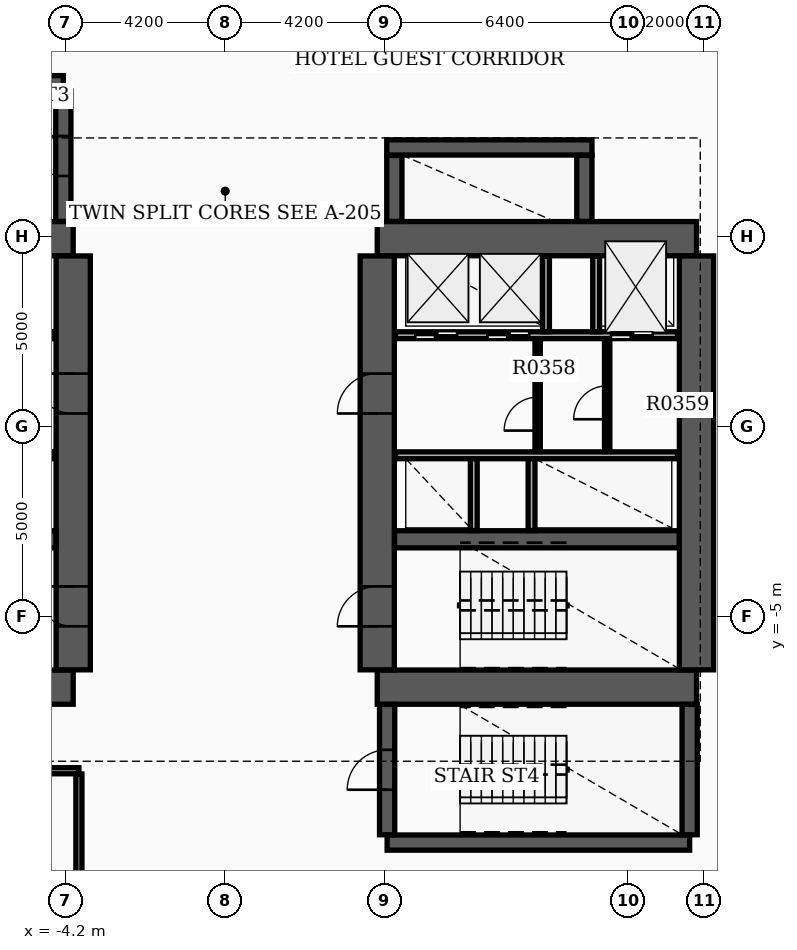
"""IFC4 building model, lengths in metres.
Left out: names, types, materials, properties, quantities, classifications, styles, units other than length and angle.
Written with IfcOpenShell. Run it as: python <this file> out.ifc"""

import sys

from ifc_helpers import new_model, si_unit, direction, frame, frame_2d, origin, place, context, subcontext, project, spatial, rectangle, extrude, element, fill, save


model = new_model("IFC4")
c1 = context("Model", 3, precision=1e-05, world=origin(), true_north=direction((0.0, 1.0)))
c2 = subcontext(c1, "Body", "Model", "MODEL_VIEW")
j1 = project(units=[si_unit("LENGTHUNIT", "METRE"), si_unit("PLANEANGLEUNIT", "RADIAN")], contexts=[c1])
p1 = place(None, origin())
s1 = spatial("IfcSite", under=j1, at=p1, CompositionType="ELEMENT")
p2 = place(p1, origin())
s2 = spatial("IfcBuilding", under=s1, at=p2, CompositionType="ELEMENT")
p3 = place(p2, frame((0.0, 0.0, 27.6)))
s3 = spatial("IfcBuildingStorey", under=s2, at=p3, CompositionType="ELEMENT", Elevation=27.6)
for number, where, z_axis, x_axis in (
    (1, (-12.4, -6.85, 0.0), (0.0, 0.0, 1.0), (1.0, 0.0, 0.0)),
    (2, (-12.4, 4.95, 0.0), (0.0, 0.0, 1.0), (1.0, 0.0, 0.0)),
):
    element("IfcWall", number, at=place(p3, frame(where, z_axis=z_axis, x_axis=x_axis)), inside=s3, PredefinedType="SHEAR", context=c2, shape_type="SweptSolid", body=[
        extrude(rectangle(XDim=8.4, YDim=0.9, at=frame_2d((4.2, 0.0))), origin(), (0.0, 0.0, 1.0), 3.7),
    ])
p4 = place(p3, frame((-4.0, -6.395, 0.0), z_axis=(0.0, 0.0, 1.0), x_axis=(0.0, 1.0, 0.0)))
e3 = element("IfcWall", 3, at=p4, inside=s3, PredefinedType="SHEAR", context=c2, shape_type="SweptSolid", body=[
    extrude(rectangle(XDim=10.89, YDim=0.9, at=frame_2d((5.445, 0.0))), origin(), (0.0, 0.0, 1.0), 3.7),
])
p5 = place(p4, frame((1.145, 0.0, 0.0)))
e4 = element("IfcOpeningElement", 4, at=p5, cuts=e3, PredefinedType="OPENING", context=c2, shape_type="SweptSolid", body=[
    extrude(rectangle(XDim=1.05, YDim=2.15, at=frame_2d((0.525, 1.075))), frame((0.0, 0.46, 0.0), z_axis=(0.0, -1.0, 0.0), x_axis=(1.0, 0.0, 0.0)), (0.0, 0.0, 1.0), 0.92),
])
p6 = place(p4, frame((6.745, 0.0, 0.0)))
e5 = element("IfcOpeningElement", 5, at=p6, cuts=e3, PredefinedType="OPENING", context=c2, shape_type="SweptSolid", body=[
    extrude(rectangle(XDim=1.05, YDim=2.15, at=frame_2d((0.525, 1.075))), frame((0.0, 0.46, 0.0), z_axis=(0.0, -1.0, 0.0), x_axis=(1.0, 0.0, 0.0)), (0.0, 0.0, 1.0), 0.92),
])
p7 = place(p3, frame((-11.945, -2.96, 0.0), z_axis=(0.0, 0.0, 1.0), x_axis=(1.0, 0.0, 0.0)))
e6 = element("IfcWall", 6, at=p7, inside=s3, PredefinedType="SHEAR", context=c2, shape_type="SweptSolid", body=[
    extrude(rectangle(XDim=7.49, YDim=0.45, at=frame_2d((3.745, 0.0))), origin(), (0.0, 0.0, 1.0), 3.7),
])
for number, where, z_axis, x_axis in (
    (7, (4.0, -6.85, 0.0), (0.0, 0.0, 1.0), (1.0, 0.0, 0.0)),
    (8, (4.0, 4.95, 0.0), (0.0, 0.0, 1.0), (1.0, 0.0, 0.0)),
):
    element("IfcWall", number, at=place(p3, frame(where, z_axis=z_axis, x_axis=x_axis)), inside=s3, PredefinedType="SHEAR", context=c2, shape_type="SweptSolid", body=[
        extrude(rectangle(XDim=8.4, YDim=0.9, at=frame_2d((4.2, 0.0))), origin(), (0.0, 0.0, 1.0), 3.7),
    ])
p8 = place(p3, frame((4.0, -6.395, 0.0), z_axis=(0.0, 0.0, 1.0), x_axis=(0.0, 1.0, 0.0)))
e9 = element("IfcWall", 9, at=p8, inside=s3, PredefinedType="SHEAR", context=c2, shape_type="SweptSolid", body=[
    extrude(rectangle(XDim=10.89, YDim=0.9, at=frame_2d((5.445, 0.0))), origin(), (0.0, 0.0, 1.0), 3.7),
])
p9 = place(p8, frame((1.145, 0.0, 0.0)))
e10 = element("IfcOpeningElement", 10, at=p9, cuts=e9, PredefinedType="OPENING", context=c2, shape_type="SweptSolid", body=[
    extrude(rectangle(XDim=1.05, YDim=2.15, at=frame_2d((0.525, 1.075))), frame((0.0, 0.46, 0.0), z_axis=(0.0, -1.0, 0.0), x_axis=(1.0, 0.0, 0.0)), (0.0, 0.0, 1.0), 0.92),
])
p10 = place(p8, frame((6.745, 0.0, 0.0)))
e11 = element("IfcOpeningElement", 11, at=p10, cuts=e9, PredefinedType="OPENING", context=c2, shape_type="SweptSolid", body=[
    extrude(rectangle(XDim=1.05, YDim=2.15, at=frame_2d((0.525, 1.075))), frame((0.0, 0.46, 0.0), z_axis=(0.0, -1.0, 0.0), x_axis=(1.0, 0.0, 0.0)), (0.0, 0.0, 1.0), 0.92),
])
p11 = place(p3, frame((12.4, -6.395, 0.0), z_axis=(0.0, 0.0, 1.0), x_axis=(0.0, 1.0, 0.0)))
e12 = element("IfcWall", 12, at=p11, inside=s3, PredefinedType="SHEAR", context=c2, shape_type="SweptSolid", body=[
    extrude(rectangle(XDim=10.89, YDim=0.9, at=frame_2d((5.445, 0.0))), origin(), (0.0, 0.0, 1.0), 3.7),
])
p12 = place(p3, frame((4.455, -2.96, 0.0), z_axis=(0.0, 0.0, 1.0), x_axis=(1.0, 0.0, 0.0)))
e13 = element("IfcWall", 13, at=p12, inside=s3, PredefinedType="SHEAR", context=c2, shape_type="SweptSolid", body=[
    extrude(rectangle(XDim=7.49, YDim=0.45, at=frame_2d((3.745, 0.0))), origin(), (0.0, 0.0, 1.0), 3.7),
])
p13 = place(p3, frame((-12.22, 9.04, 0.0), z_axis=(0.0, 0.0, 1.0), x_axis=(1.0, 0.0, 0.0)))
e14 = element("IfcWall", 14, at=p13, inside=s3, PredefinedType="SHEAR", context=c2, shape_type="SweptSolid", body=[
    extrude(rectangle(XDim=7.96, YDim=0.4, at=frame_2d((3.98, 0.0))), origin(), (0.0, 0.0, 1.0), 3.7),
])
p14 = place(p3, frame((-4.26, 5.405, 0.0), z_axis=(0.0, 0.0, 1.0), x_axis=(0.0, 1.0, 0.0)))
e15 = element("IfcWall", 15, at=p14, inside=s3, PredefinedType="SHEAR", context=c2, shape_type="SweptSolid", body=[
    extrude(rectangle(XDim=3.43, YDim=0.4, at=frame_2d((1.715, 0.0))), origin(), (0.0, 0.0, 1.0), 3.7),
])
p15 = place(p14, frame((1.195, 0.0, 0.0)))
e16 = element("IfcOpeningElement", 16, at=p15, cuts=e15, PredefinedType="OPENING", context=c2, shape_type="SweptSolid", body=[
    extrude(rectangle(XDim=1.05, YDim=2.15, at=frame_2d((0.525, 1.075))), frame((0.0, 0.21, 0.0), z_axis=(0.0, -1.0, 0.0), x_axis=(1.0, 0.0, 0.0)), (0.0, 0.0, 1.0), 0.42),
])
p16 = place(p3, frame((4.26, -10.94, 0.0), z_axis=(0.0, 0.0, 1.0), x_axis=(1.0, 0.0, 0.0)))
e17 = element("IfcWall", 17, at=p16, inside=s3, PredefinedType="SHEAR", context=c2, shape_type="SweptSolid", body=[
    extrude(rectangle(XDim=7.96, YDim=0.4, at=frame_2d((3.98, 0.0))), origin(), (0.0, 0.0, 1.0), 3.7),
])
p17 = place(p3, frame((4.26, -10.735, 0.0), z_axis=(0.0, 0.0, 1.0), x_axis=(0.0, 1.0, 0.0)))
e18 = element("IfcWall", 18, at=p17, inside=s3, PredefinedType="SHEAR", context=c2, shape_type="SweptSolid", body=[
    extrude(rectangle(XDim=3.43, YDim=0.4, at=frame_2d((1.715, 0.0))), origin(), (0.0, 0.0, 1.0), 3.7),
])
p18 = place(p17, frame((1.185, 0.0, 0.0)))
e19 = element("IfcOpeningElement", 19, at=p18, cuts=e18, PredefinedType="OPENING", context=c2, shape_type="SweptSolid", body=[
    extrude(rectangle(XDim=1.05, YDim=2.15, at=frame_2d((0.525, 1.075))), frame((0.0, 0.21, 0.0), z_axis=(0.0, -1.0, 0.0), x_axis=(1.0, 0.0, 0.0)), (0.0, 0.0, 1.0), 0.42),
])
p19 = place(p3, frame((12.22, -10.735, 0.0), z_axis=(0.0, 0.0, 1.0), x_axis=(0.0, 1.0, 0.0)))
e20 = element("IfcWall", 20, at=p19, inside=s3, PredefinedType="SHEAR", context=c2, shape_type="SweptSolid", body=[
    extrude(rectangle(XDim=3.43, YDim=0.4, at=frame_2d((1.715, 0.0))), origin(), (0.0, 0.0, 1.0), 3.7),
])
p20 = place(p3, frame((4.45, 5.405, 0.0), z_axis=(0.0, 0.0, 1.0), x_axis=(0.0, 1.0, 0.0)))
e21 = element("IfcWall", 21, at=p20, inside=s3, PredefinedType="SHEAR", context=c2, shape_type="SweptSolid", body=[
    extrude(rectangle(XDim=1.735, YDim=0.4, at=frame_2d((0.867, 0.0))), origin(), (0.0, 0.0, 1.0), 3.7),
])
p21 = place(p3, frame((4.25, 7.35, 0.0), z_axis=(0.0, 0.0, 1.0), x_axis=(1.0, 0.0, 0.0)))
e22 = element("IfcWall", 22, at=p21, inside=s3, PredefinedType="SHEAR", context=c2, shape_type="SweptSolid", body=[
    extrude(rectangle(XDim=5.4, YDim=0.4, at=frame_2d((2.7, 0.0))), origin(), (0.0, 0.0, 1.0), 3.7),
])
p22 = place(p3, frame((9.45, 5.405, 0.0), z_axis=(0.0, 0.0, 1.0), x_axis=(0.0, 1.0, 0.0)))
e23 = element("IfcWall", 23, at=p22, inside=s3, PredefinedType="SHEAR", context=c2, shape_type="SweptSolid", body=[
    extrude(rectangle(XDim=1.735, YDim=0.4, at=frame_2d((0.867, 0.0))), origin(), (0.0, 0.0, 1.0), 3.7),
])
p23 = place(p3, frame((-11.9, 2.41, 0.0), z_axis=(0.0, 0.0, 1.0), x_axis=(1.0, 0.0, 0.0)))
e24 = element("IfcWall", 24, at=p23, inside=s3, PredefinedType="SOLIDWALL", context=c2, shape_type="SweptSolid", body=[
    extrude(rectangle(XDim=7.42, YDim=0.18, at=frame_2d((3.71, 0.0))), origin(), (0.0, 0.0, 1.0), 2.9),
])
p24 = place(p23, frame((0.55, 0.0, 0.0)))
e25 = element("IfcOpeningElement", 25, at=p24, cuts=e24, PredefinedType="OPENING", context=c2, shape_type="SweptSolid", body=[
    extrude(rectangle(XDim=1.1, YDim=2.15, at=frame_2d((0.55, 1.075))), frame((0.0, 0.1, 0.0), z_axis=(0.0, -1.0, 0.0), x_axis=(1.0, 0.0, 0.0)), (0.0, 0.0, 1.0), 0.2),
])
p25 = place(p23, frame((3.85, 0.0, 0.0)))
e26 = element("IfcOpeningElement", 26, at=p25, cuts=e24, PredefinedType="OPENING", context=c2, shape_type="SweptSolid", body=[
    extrude(rectangle(XDim=1.1, YDim=2.15, at=frame_2d((0.55, 1.075))), frame((0.0, 0.1, 0.0), z_axis=(0.0, -1.0, 0.0), x_axis=(1.0, 0.0, 0.0)), (0.0, 0.0, 1.0), 0.2),
])
p26 = place(p23, frame((5.75, 0.0, 0.0)))
e27 = element("IfcOpeningElement", 27, at=p26, cuts=e24, PredefinedType="OPENING", context=c2, shape_type="SweptSolid", body=[
    extrude(rectangle(XDim=1.1, YDim=2.15, at=frame_2d((0.55, 1.075))), frame((0.0, 0.1, 0.0), z_axis=(0.0, -1.0, 0.0), x_axis=(1.0, 0.0, 0.0)), (0.0, 0.0, 1.0), 0.2),
])
p27 = place(p3, frame((4.48, 2.41, 0.0), z_axis=(0.0, 0.0, 1.0), x_axis=(1.0, 0.0, 0.0)))
e28 = element("IfcWall", 28, at=p27, inside=s3, PredefinedType="SOLIDWALL", context=c2, shape_type="SweptSolid", body=[
    extrude(rectangle(XDim=7.42, YDim=0.18, at=frame_2d((3.71, 0.0))), origin(), (0.0, 0.0, 1.0), 2.9),
])
p28 = place(p27, frame((5.67, 0.0, 0.0)))
e29 = element("IfcOpeningElement", 29, at=p28, cuts=e28, PredefinedType="OPENING", context=c2, shape_type="SweptSolid", body=[
    extrude(rectangle(XDim=1.1, YDim=2.15, at=frame_2d((0.55, 1.075))), frame((0.0, 0.1, 0.0), z_axis=(0.0, -1.0, 0.0), x_axis=(1.0, 0.0, 0.0)), (0.0, 0.0, 1.0), 0.2),
])
p29 = place(p27, frame((0.52, 0.0, 0.0)))
e30 = element("IfcOpeningElement", 30, at=p29, cuts=e28, PredefinedType="OPENING", context=c2, shape_type="SweptSolid", body=[
    extrude(rectangle(XDim=1.1, YDim=2.15, at=frame_2d((0.55, 1.075))), frame((0.0, 0.1, 0.0), z_axis=(0.0, -1.0, 0.0), x_axis=(1.0, 0.0, 0.0)), (0.0, 0.0, 1.0), 0.2),
])
p30 = place(p27, frame((2.42, 0.0, 0.0)))
e31 = element("IfcOpeningElement", 31, at=p30, cuts=e28, PredefinedType="OPENING", context=c2, shape_type="SweptSolid", body=[
    extrude(rectangle(XDim=1.1, YDim=2.15, at=frame_2d((0.55, 1.075))), frame((0.0, 0.1, 0.0), z_axis=(0.0, -1.0, 0.0), x_axis=(1.0, 0.0, 0.0)), (0.0, 0.0, 1.0), 0.2),
])
for number, where, z_axis, x_axis in (
    (32, (-11.9, -0.75, 0.0), (0.0, 0.0, 1.0), (1.0, 0.0, 0.0)),
    (33, (4.48, -0.75, 0.0), (0.0, 0.0, 1.0), (1.0, 0.0, 0.0)),
):
    element("IfcWall", number, at=place(p3, frame(where, z_axis=z_axis, x_axis=x_axis)), inside=s3, PredefinedType="SOLIDWALL", context=c2, shape_type="SweptSolid", body=[
        extrude(rectangle(XDim=7.42, YDim=0.18, at=frame_2d((3.71, 0.0))), origin(), (0.0, 0.0, 1.0), 2.9),
    ])
for number, where, z_axis, x_axis in (
    (34, (8.44, 2.5, 0.0), (0.0, 0.0, 1.0), (0.0, 1.0, 0.0)),
    (35, (9.76, 2.5, 0.0), (0.0, 0.0, 1.0), (0.0, 1.0, 0.0)),
):
    element("IfcWall", number, at=place(p3, frame(where, z_axis=z_axis, x_axis=x_axis)), inside=s3, PredefinedType="SOLIDWALL", context=c2, shape_type="SweptSolid", body=[
        extrude(rectangle(XDim=1.99, YDim=0.18, at=frame_2d((0.995, 0.0))), origin(), (0.0, 0.0, 1.0), 2.9),
    ])
for number, where, z_axis, x_axis in (
    (36, (6.54, -2.73, 0.0), (0.0, 0.0, 1.0), (0.0, 1.0, 0.0)),
    (37, (8.06, -2.73, 0.0), (0.0, 0.0, 1.0), (0.0, 1.0, 0.0)),
):
    element("IfcWall", number, at=place(p3, frame(where, z_axis=z_axis, x_axis=x_axis)), inside=s3, PredefinedType="SOLIDWALL", context=c2, shape_type="SweptSolid", body=[
        extrude(rectangle(XDim=1.89, YDim=0.18, at=frame_2d((0.945, 0.0))), origin(), (0.0, 0.0, 1.0), 2.9),
    ])
p31 = place(p3, frame((8.22, -0.65, 0.0), z_axis=(0.0, 0.0, 1.0), x_axis=(0.0, 1.0, 0.0)))
e38 = element("IfcWall", 38, at=p31, inside=s3, PredefinedType="SOLIDWALL", context=c2, shape_type="SweptSolid", body=[
    extrude(rectangle(XDim=2.96, YDim=0.14, at=frame_2d((1.48, 0.0))), origin(), (0.0, 0.0, 1.0), 2.9),
])
p32 = place(p31, frame((0.55, 0.0, 0.0)))
e39 = element("IfcOpeningElement", 39, at=p32, cuts=e38, PredefinedType="OPENING", context=c2, shape_type="SweptSolid", body=[
    extrude(rectangle(XDim=0.88, YDim=2.1, at=frame_2d((0.44, 1.05))), frame((0.0, 0.08, 0.0), z_axis=(0.0, -1.0, 0.0), x_axis=(1.0, 0.0, 0.0)), (0.0, 0.0, 1.0), 0.16),
])
p33 = place(p3, frame((10.05, -0.652, 0.0), z_axis=(0.0, 0.0, 1.0), x_axis=(0.0, 1.0, 0.0)))
e40 = element("IfcWall", 40, at=p33, inside=s3, PredefinedType="PARTITIONING", context=c2, shape_type="SweptSolid", body=[
    extrude(rectangle(XDim=2.962, YDim=0.14, at=frame_2d((1.481, 0.0))), origin(), (0.0, 0.0, 1.0), 2.9),
])
p34 = place(p33, frame((0.85, 0.0, 0.0)))
e41 = element("IfcOpeningElement", 41, at=p34, cuts=e40, PredefinedType="OPENING", context=c2, shape_type="SweptSolid", body=[
    extrude(rectangle(XDim=0.88, YDim=2.1, at=frame_2d((0.44, 1.05))), frame((0.0, 0.08, 0.0), z_axis=(0.0, -1.0, 0.0), x_axis=(1.0, 0.0, 0.0)), (0.0, 0.0, 1.0), 0.16),
])
p35 = place(p3, frame((-12.4, -9.05, 0.0), z_axis=(0.0, 0.0, 1.0), x_axis=(1.0, 0.0, 0.0)))
e42 = element("IfcWall", 42, at=p35, inside=s3, PredefinedType="PARTITIONING", context=c2, shape_type="SweptSolid", body=[
    extrude(rectangle(XDim=8.55, YDim=0.16, at=frame_2d((4.275, 0.0))), origin(), (0.0, 0.0, 1.0), 2.9),
])
p36 = place(p35, frame((3.795, 0.0, 0.0)))
e43 = element("IfcOpeningElement", 43, at=p36, cuts=e42, PredefinedType="OPENING", context=c2, shape_type="SweptSolid", body=[
    extrude(rectangle(XDim=0.96, YDim=2.15, at=frame_2d((0.48, 1.075))), frame((0.0, 0.09, 0.0), z_axis=(0.0, -1.0, 0.0), x_axis=(1.0, 0.0, 0.0)), (0.0, 0.0, 1.0), 0.18),
])
p37 = place(p3, frame((-3.85, -13.065, 0.0), z_axis=(0.0, 0.0, 1.0), x_axis=(0.0, 1.0, 0.0)))
e44 = element("IfcWall", 44, at=p37, inside=s3, PredefinedType="PARTITIONING", context=c2, shape_type="SweptSolid", body=[
    extrude(rectangle(XDim=3.93, YDim=0.16, at=frame_2d((1.965, 0.0))), origin(), (0.0, 0.0, 1.0), 2.9),
])
p38 = place(p5, origin())
e45 = element("IfcDoor", 45, at=p38, inside=s3, OperationType="SINGLE_SWING_RIGHT", PredefinedType="DOOR", context=c2, shape_type="SweptSolid", body=[
    extrude(rectangle(XDim=1.05, YDim=2.15, at=frame_2d((0.525, 1.075))), frame((0.0, 0.025, 0.0), z_axis=(0.0, -1.0, 0.0), x_axis=(1.0, 0.0, 0.0)), (0.0, 0.0, 1.0), 0.05),
])
fill(e4, e45)
p39 = place(p9, origin())
e46 = element("IfcDoor", 46, at=p39, inside=s3, OperationType="SINGLE_SWING_LEFT", PredefinedType="DOOR", context=c2, shape_type="SweptSolid", body=[
    extrude(rectangle(XDim=1.05, YDim=2.15, at=frame_2d((0.525, 1.075))), frame((0.0, 0.025, 0.0), z_axis=(0.0, -1.0, 0.0), x_axis=(1.0, 0.0, 0.0)), (0.0, 0.0, 1.0), 0.05),
])
fill(e10, e46)
p40 = place(p6, origin())
e47 = element("IfcDoor", 47, at=p40, inside=s3, OperationType="SINGLE_SWING_RIGHT", PredefinedType="DOOR", context=c2, shape_type="SweptSolid", body=[
    extrude(rectangle(XDim=1.05, YDim=2.15, at=frame_2d((0.525, 1.075))), frame((0.0, 0.025, 0.0), z_axis=(0.0, -1.0, 0.0), x_axis=(1.0, 0.0, 0.0)), (0.0, 0.0, 1.0), 0.05),
])
fill(e5, e47)
p41 = place(p10, origin())
e48 = element("IfcDoor", 48, at=p41, inside=s3, OperationType="SINGLE_SWING_LEFT", PredefinedType="DOOR", context=c2, shape_type="SweptSolid", body=[
    extrude(rectangle(XDim=1.05, YDim=2.15, at=frame_2d((0.525, 1.075))), frame((0.0, 0.025, 0.0), z_axis=(0.0, -1.0, 0.0), x_axis=(1.0, 0.0, 0.0)), (0.0, 0.0, 1.0), 0.05),
])
fill(e11, e48)
p42 = place(p15, origin())
e49 = element("IfcDoor", 49, at=p42, inside=s3, OperationType="SINGLE_SWING_RIGHT", PredefinedType="DOOR", context=c2, shape_type="SweptSolid", body=[
    extrude(rectangle(XDim=1.05, YDim=2.15, at=frame_2d((0.525, 1.075))), frame((0.0, 0.025, 0.0), z_axis=(0.0, -1.0, 0.0), x_axis=(1.0, 0.0, 0.0)), (0.0, 0.0, 1.0), 0.05),
])
fill(e16, e49)
p43 = place(p18, origin())
e50 = element("IfcDoor", 50, at=p43, inside=s3, OperationType="SINGLE_SWING_LEFT", PredefinedType="DOOR", context=c2, shape_type="SweptSolid", body=[
    extrude(rectangle(XDim=1.05, YDim=2.15, at=frame_2d((0.525, 1.075))), frame((0.0, 0.025, 0.0), z_axis=(0.0, -1.0, 0.0), x_axis=(1.0, 0.0, 0.0)), (0.0, 0.0, 1.0), 0.05),
])
fill(e19, e50)
p44 = place(p28, origin())
e51 = element("IfcDoor", 51, at=p44, inside=s3, OperationType="DOUBLE_DOOR_SLIDING", PredefinedType="DOOR", context=c2, shape_type="SweptSolid", body=[
    extrude(rectangle(XDim=1.1, YDim=2.15, at=frame_2d((0.55, 1.075))), frame((0.0, 0.025, 0.0), z_axis=(0.0, -1.0, 0.0), x_axis=(1.0, 0.0, 0.0)), (0.0, 0.0, 1.0), 0.05),
])
fill(e29, e51)
p45 = place(p29, origin())
e52 = element("IfcDoor", 52, at=p45, inside=s3, OperationType="DOUBLE_DOOR_SLIDING", PredefinedType="DOOR", context=c2, shape_type="SweptSolid", body=[
    extrude(rectangle(XDim=1.1, YDim=2.15, at=frame_2d((0.55, 1.075))), frame((0.0, 0.025, 0.0), z_axis=(0.0, -1.0, 0.0), x_axis=(1.0, 0.0, 0.0)), (0.0, 0.0, 1.0), 0.05),
])
fill(e30, e52)
p46 = place(p30, origin())
e53 = element("IfcDoor", 53, at=p46, inside=s3, OperationType="DOUBLE_DOOR_SLIDING", PredefinedType="DOOR", context=c2, shape_type="SweptSolid", body=[
    extrude(rectangle(XDim=1.1, YDim=2.15, at=frame_2d((0.55, 1.075))), frame((0.0, 0.025, 0.0), z_axis=(0.0, -1.0, 0.0), x_axis=(1.0, 0.0, 0.0)), (0.0, 0.0, 1.0), 0.05),
])
fill(e31, e53)
p47 = place(p32, origin())
e54 = element("IfcDoor", 54, at=p47, inside=s3, OperationType="SINGLE_SWING_LEFT", PredefinedType="DOOR", context=c2, shape_type="SweptSolid", body=[
    extrude(rectangle(XDim=0.88, YDim=2.1, at=frame_2d((0.44, 1.05))), frame((0.0, 0.025, 0.0), z_axis=(0.0, -1.0, 0.0), x_axis=(1.0, 0.0, 0.0)), (0.0, 0.0, 1.0), 0.05),
])
fill(e39, e54)
p48 = place(p34, origin())
e55 = element("IfcDoor", 55, at=p48, inside=s3, OperationType="SINGLE_SWING_LEFT", PredefinedType="DOOR", context=c2, shape_type="SweptSolid", body=[
    extrude(rectangle(XDim=0.88, YDim=2.1, at=frame_2d((0.44, 1.05))), frame((0.0, 0.025, 0.0), z_axis=(0.0, -1.0, 0.0), x_axis=(1.0, 0.0, 0.0)), (0.0, 0.0, 1.0), 0.05),
])
fill(e41, e55)
save(model, sys.argv[1])
